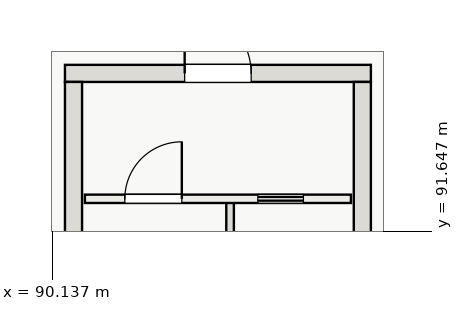
"""IFC4 building model, lengths in metres.
Left out: names, types, materials, properties, quantities, classifications, styles, units other than length and angle.
Written with IfcOpenShell. Run it as: python <this file> out.ifc"""

import sys

from ifc_helpers import new_model, si_unit, direction, frame, frame_2d, origin, place, context, subcontext, project, spatial, rectangle, extrude, element, fill, save


model = new_model("IFC4")
c1 = context("Model", 3, precision=1e-05, world=origin(), true_north=direction((0.0, 1.0)))
c2 = subcontext(c1, "Body", "Model", "MODEL_VIEW")
j1 = project(units=[si_unit("LENGTHUNIT", "METRE"), si_unit("PLANEANGLEUNIT", "RADIAN")], contexts=[c1])
p1 = place(None, origin())
s1 = spatial("IfcSite", under=j1, at=p1, CompositionType="ELEMENT")
p2 = place(p1, origin())
s2 = spatial("IfcBuilding", under=s1, at=p2, CompositionType="ELEMENT")
p3 = place(p2, frame((0.0, 0.0, 21.6)))
s3 = spatial("IfcBuildingStorey", under=s2, at=p3, CompositionType="ELEMENT", Elevation=21.6)
p4 = place(p3, frame((90.475, 95.8, 0.0), z_axis=(0.0, 0.0, 1.0), x_axis=(1.0, 0.0, 0.0)))
e1 = element("IfcWall", 1, at=p4, inside=s3, PredefinedType="SHEAR", context=c2, shape_type="SweptSolid", body=[
    extrude(rectangle(XDim=8.05, YDim=0.45, at=frame_2d((4.025, 0.0))), origin(), (0.0, 0.0, 1.0), 4.8),
])
p5 = place(p4, frame((3.15, 0.0, 0.0)))
e2 = element("IfcOpeningElement", 2, at=p5, cuts=e1, PredefinedType="OPENING", context=c2, shape_type="SweptSolid", body=[
    extrude(rectangle(XDim=1.75, YDim=2.3, at=frame_2d((0.875, 1.15))), frame((0.0, 0.235, 0.0), z_axis=(0.0, -1.0, 0.0), x_axis=(1.0, 0.0, 0.0)), (0.0, 0.0, 1.0), 0.47),
])
for number, where, z_axis, x_axis in (
    (3, (90.7, 84.425, 0.0), (0.0, 0.0, 1.0), (0.0, 1.0, 0.0)),
    (4, (98.3, 84.425, 0.0), (0.0, 0.0, 1.0), (0.0, 1.0, 0.0)),
):
    element("IfcWall", number, at=place(p3, frame(where, z_axis=z_axis, x_axis=x_axis)), inside=s3, PredefinedType="SHEAR", context=c2, shape_type="SweptSolid", body=[
        extrude(rectangle(XDim=11.15, YDim=0.45, at=frame_2d((5.575, 0.0))), origin(), (0.0, 0.0, 1.0), 4.8),
    ])
p6 = place(p3, frame((94.82, 84.45, 0.0), z_axis=(0.0, 0.0, 1.0), x_axis=(0.0, 1.0, 0.0)))
e5 = element("IfcWall", 5, at=p6, inside=s3, PredefinedType="SOLIDWALL", context=c2, shape_type="SweptSolid", body=[
    extrude(rectangle(XDim=8.0, YDim=0.2, at=frame_2d((4.0, 0.0))), origin(), (0.0, 0.0, 1.0), 4.8),
])
p7 = place(p3, frame((91.0, 92.5, 0.0), z_axis=(0.0, 0.0, 1.0), x_axis=(1.0, 0.0, 0.0)))
e6 = element("IfcWall", 6, at=p7, inside=s3, PredefinedType="SOLIDWALL", context=c2, shape_type="SweptSolid", body=[
    extrude(rectangle(XDim=7.0, YDim=0.22, at=frame_2d((3.5, 0.0))), origin(), (0.0, 0.0, 1.0), 4.53),
])
p8 = place(p7, frame((1.05, 0.0, 0.0)))
e7 = element("IfcOpeningElement", 7, at=p8, cuts=e6, PredefinedType="OPENING", context=c2, shape_type="SweptSolid", body=[
    extrude(rectangle(XDim=1.5, YDim=2.2, at=frame_2d((0.75, 1.1))), frame((0.0, 0.12, 0.0), z_axis=(0.0, -1.0, 0.0), x_axis=(1.0, 0.0, 0.0)), (0.0, 0.0, 1.0), 0.24),
])
p9 = place(p7, frame((4.55, 0.0, 0.0)))
e8 = element("IfcOpeningElement", 8, at=p9, cuts=e6, PredefinedType="OPENING", context=c2, shape_type="SweptSolid", body=[
    extrude(rectangle(XDim=1.2, YDim=2.2, at=frame_2d((0.6, 1.1))), frame((0.0, 0.12, 0.0), z_axis=(0.0, -1.0, 0.0), x_axis=(1.0, 0.0, 0.0)), (0.0, 0.0, 1.0), 0.24),
])
p10 = place(p8, origin())
e9 = element("IfcDoor", 9, at=p10, inside=s3, OperationType="SINGLE_SWING_RIGHT", PredefinedType="DOOR", context=c2, shape_type="SweptSolid", body=[
    extrude(rectangle(XDim=1.5, YDim=2.2, at=frame_2d((0.75, 1.1))), frame((0.0, 0.025, 0.0), z_axis=(0.0, -1.0, 0.0), x_axis=(1.0, 0.0, 0.0)), (0.0, 0.0, 1.0), 0.05),
])
fill(e7, e9)
p11 = place(p9, origin())
e10 = element("IfcDoor", 10, at=p11, inside=s3, OperationType="SLIDING_TO_RIGHT", PredefinedType="DOOR", context=c2, shape_type="SweptSolid", body=[
    extrude(rectangle(XDim=1.2, YDim=2.2, at=frame_2d((0.6, 1.1))), frame((0.0, 0.025, 0.0), z_axis=(0.0, -1.0, 0.0), x_axis=(1.0, 0.0, 0.0)), (0.0, 0.0, 1.0), 0.05),
])
fill(e8, e10)
p12 = place(p5, frame((1.75, 0.0, 0.0), z_axis=(0.0, 0.0, 1.0), x_axis=(-1.0, 0.0, 0.0)))
e11 = element("IfcDoor", 11, at=p12, inside=s3, OperationType="DOUBLE_DOOR_SINGLE_SWING", PredefinedType="DOOR", context=c2, shape_type="SweptSolid", body=[
    extrude(rectangle(XDim=1.75, YDim=2.3, at=frame_2d((0.875, 1.15))), frame((0.0, 0.025, 0.0), z_axis=(0.0, -1.0, 0.0), x_axis=(1.0, 0.0, 0.0)), (0.0, 0.0, 1.0), 0.05),
])
fill(e2, e11)
save(model, sys.argv[1])
